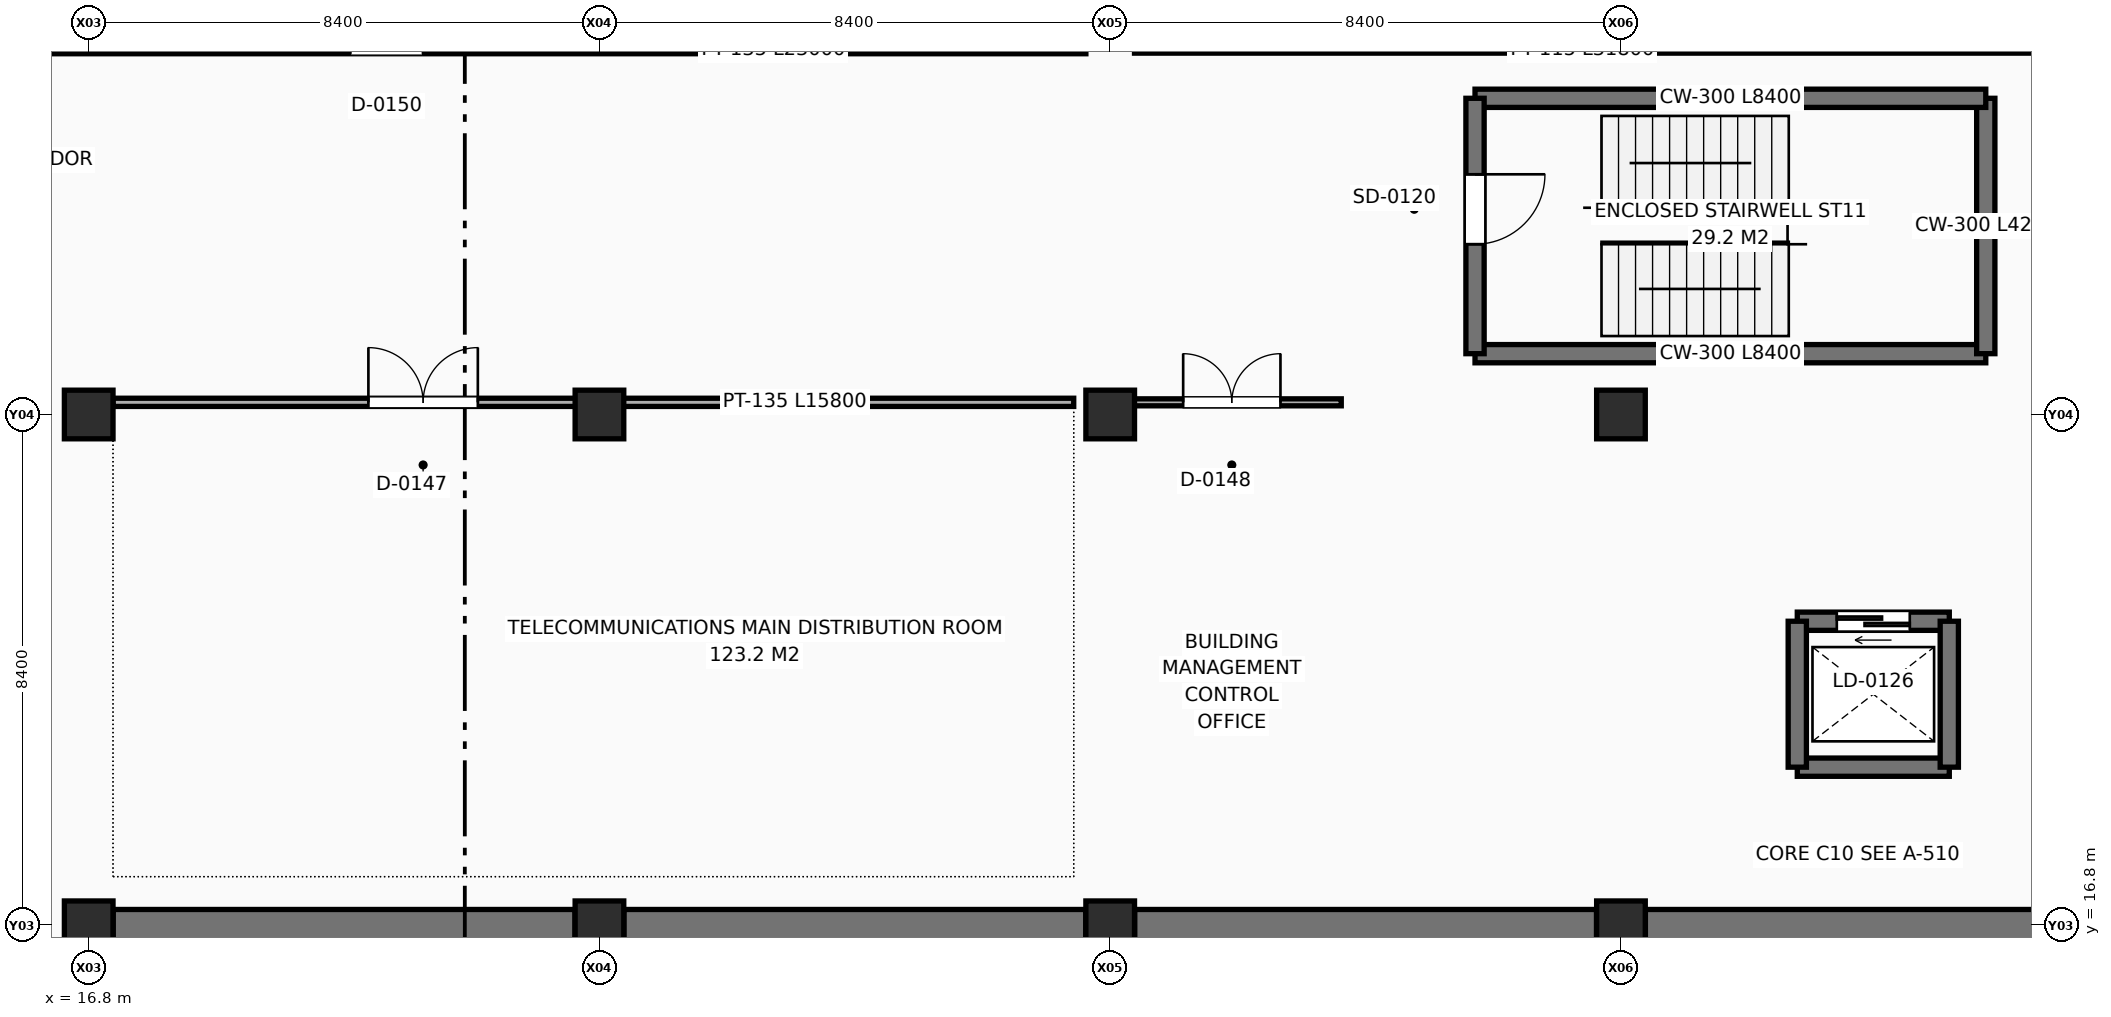
"""IFC4 building model, lengths in metres.
Left out: names, types, materials, properties, quantities, classifications, styles, units other than length and angle.
Written with IfcOpenShell. Run it as: python <this file> out.ifc"""

import sys

from ifc_helpers import new_model, si_unit, direction, frame, frame_2d, origin, origin_2d, place, context, subcontext, project, spatial, rectangle, extrude, element, fill, save


model = new_model("IFC4")
c1 = context("Model", 3, precision=1e-05, world=origin(), true_north=direction((0.0, 1.0)))
c2 = subcontext(c1, "Body", "Model", "MODEL_VIEW")
j1 = project(units=[si_unit("LENGTHUNIT", "METRE"), si_unit("PLANEANGLEUNIT", "RADIAN")], contexts=[c1])
p1 = place(None, origin())
s1 = spatial("IfcSite", under=j1, at=p1, CompositionType="ELEMENT")
p2 = place(p1, origin())
s2 = spatial("IfcBuilding", under=s1, at=p2, CompositionType="ELEMENT")
p3 = place(p2, frame((0.0, 0.0, -4.2)))
s3 = spatial("IfcBuildingStorey", under=s2, at=p3, CompositionType="ELEMENT", Elevation=-4.2)
for number, where, z_axis, x_axis in (
    (1, (16.8, 16.8, 0.0), (0.0, 0.0, 1.0), (1.0, 0.0, 0.0)),
    (2, (16.8, 25.2, 0.0), (0.0, 0.0, 1.0), (1.0, 0.0, 0.0)),
    (3, (25.2, 16.8, 0.0), (0.0, 0.0, 1.0), (1.0, 0.0, 0.0)),
    (4, (25.2, 25.2, 0.0), (0.0, 0.0, 1.0), (1.0, 0.0, 0.0)),
    (5, (33.6, 16.8, 0.0), (0.0, 0.0, 1.0), (1.0, 0.0, 0.0)),
    (6, (33.6, 25.2, 0.0), (0.0, 0.0, 1.0), (1.0, 0.0, 0.0)),
    (7, (42.0, 16.8, 0.0), (0.0, 0.0, 1.0), (1.0, 0.0, 0.0)),
    (8, (42.0, 25.2, 0.0), (0.0, 0.0, 1.0), (1.0, 0.0, 0.0)),
):
    element("IfcColumn", number, at=place(p3, frame(where, z_axis=z_axis, x_axis=x_axis)), inside=s3, PredefinedType="COLUMN", context=c2, shape_type="SweptSolid", body=[
        extrude(rectangle(XDim=0.8, YDim=0.8, at=origin_2d()), origin(), (0.0, 0.0, 1.0), 4.2),
    ])
p4 = place(p3, frame((17.202, 16.8, 0.0), z_axis=(0.0, 0.0, 1.0), x_axis=(1.0, 0.0, 0.0)))
e9 = element("IfcWall", 9, at=p4, inside=s3, PredefinedType="SOLIDWALL", context=c2, shape_type="SweptSolid", body=[
    extrude(rectangle(XDim=7.596, YDim=0.52, at=frame_2d((3.798, 0.0))), origin(), (0.0, 0.0, 1.0), 3.94),
])
for number, where, z_axis, x_axis in (
    (10, (25.602, 16.8, 0.0), (0.0, 0.0, 1.0), (1.0, 0.0, 0.0)),
    (11, (34.002, 16.8, 0.0), (0.0, 0.0, 1.0), (1.0, 0.0, 0.0)),
    (12, (42.402, 16.8, 0.0), (0.0, 0.0, 1.0), (1.0, 0.0, 0.0)),
):
    element("IfcWall", number, at=place(p3, frame(where, z_axis=z_axis, x_axis=x_axis)), inside=s3, PredefinedType="SOLIDWALL", context=c2, shape_type="SweptSolid", body=[
        extrude(rectangle(XDim=7.596, YDim=0.52, at=frame_2d((3.798, 0.0))), origin(), (0.0, 0.0, 1.0), 3.94),
    ])
p5 = place(p3, frame((39.6, 26.2, 0.0), z_axis=(0.0, 0.0, 1.0), x_axis=(1.0, 0.0, 0.0)))
e13 = element("IfcWall", 13, at=p5, inside=s3, PredefinedType="SHEAR", context=c2, shape_type="SweptSolid", body=[
    extrude(rectangle(XDim=8.4, YDim=0.3, at=frame_2d((4.2, 0.0))), origin(), (0.0, 0.0, 1.0), 3.92),
])
p6 = place(p3, frame((48.0, 26.2, 0.0), z_axis=(0.0, 0.0, 1.0), x_axis=(0.0, 1.0, 0.0)))
e14 = element("IfcWall", 14, at=p6, inside=s3, PredefinedType="SHEAR", context=c2, shape_type="SweptSolid", body=[
    extrude(rectangle(XDim=4.2, YDim=0.3, at=frame_2d((2.1, 0.0))), origin(), (0.0, 0.0, 1.0), 3.92),
])
p7 = place(p3, frame((48.0, 30.4, 0.0), z_axis=(0.0, 0.0, 1.0), x_axis=(-1.0, 0.0, 0.0)))
e15 = element("IfcWall", 15, at=p7, inside=s3, PredefinedType="SHEAR", context=c2, shape_type="SweptSolid", body=[
    extrude(rectangle(XDim=8.4, YDim=0.3, at=frame_2d((4.2, 0.0))), origin(), (0.0, 0.0, 1.0), 3.92),
])
p8 = place(p3, frame((39.6, 30.4, 0.0), z_axis=(0.0, 0.0, 1.0), x_axis=(0.0, -1.0, 0.0)))
e16 = element("IfcWall", 16, at=p8, inside=s3, PredefinedType="SHEAR", context=c2, shape_type="SweptSolid", body=[
    extrude(rectangle(XDim=4.2, YDim=0.3, at=frame_2d((2.1, 0.0))), origin(), (0.0, 0.0, 1.0), 3.92),
])
p9 = place(p8, frame((1.25, 0.0, 0.0)))
e17 = element("IfcOpeningElement", 17, at=p9, cuts=e16, PredefinedType="OPENING", context=c2, shape_type="SweptSolid", body=[
    extrude(rectangle(XDim=1.15, YDim=2.2, at=frame_2d((0.575, 1.1))), frame((0.0, 0.16, 0.0), z_axis=(0.0, -1.0, 0.0), x_axis=(1.0, 0.0, 0.0)), (0.0, 0.0, 1.0), 0.32),
])
p10 = place(p3, frame((47.4, 21.8, 0.0), z_axis=(0.0, 0.0, 1.0), x_axis=(-1.0, 0.0, 0.0)))
e18 = element("IfcWall", 18, at=p10, inside=s3, PredefinedType="SHEAR", context=c2, shape_type="SweptSolid", body=[
    extrude(rectangle(XDim=2.5, YDim=0.3, at=frame_2d((1.25, 0.0))), origin(), (0.0, 0.0, 1.0), 3.92),
])
p11 = place(p10, frame((0.65, 0.0, 0.0)))
e19 = element("IfcOpeningElement", 19, at=p11, cuts=e18, PredefinedType="OPENING", context=c2, shape_type="SweptSolid", body=[
    extrude(rectangle(XDim=1.2, YDim=2.25, at=frame_2d((0.6, 1.125))), frame((0.0, 0.16, 0.0), z_axis=(0.0, -1.0, 0.0), x_axis=(1.0, 0.0, 0.0)), (0.0, 0.0, 1.0), 0.32),
])
p12 = place(p3, frame((44.9, 19.4, 0.0), z_axis=(0.0, 0.0, 1.0), x_axis=(1.0, 0.0, 0.0)))
e20 = element("IfcWall", 20, at=p12, inside=s3, PredefinedType="SHEAR", context=c2, shape_type="SweptSolid", body=[
    extrude(rectangle(XDim=2.5, YDim=0.3, at=frame_2d((1.25, 0.0))), origin(), (0.0, 0.0, 1.0), 3.92),
])
for number, where, z_axis, x_axis in (
    (21, (44.9, 21.8, 0.0), (0.0, 0.0, 1.0), (0.0, -1.0, 0.0)),
    (22, (47.4, 19.4, 0.0), (0.0, 0.0, 1.0), (0.0, 1.0, 0.0)),
):
    element("IfcWall", number, at=place(p3, frame(where, z_axis=z_axis, x_axis=x_axis)), inside=s3, PredefinedType="SHEAR", context=c2, shape_type="SweptSolid", body=[
        extrude(rectangle(XDim=2.4, YDim=0.3, at=frame_2d((1.2, 0.0))), origin(), (0.0, 0.0, 1.0), 3.92),
    ])
p13 = place(p3, frame((17.2, 25.4, 0.0), z_axis=(0.0, 0.0, 1.0), x_axis=(1.0, 0.0, 0.0)))
e23 = element("IfcWall", 23, at=p13, inside=s3, PredefinedType="PARTITIONING", context=c2, shape_type="SweptSolid", body=[
    extrude(rectangle(XDim=15.8, YDim=0.135, at=frame_2d((7.9, 0.0))), origin(), (0.0, 0.0, 1.0), 3.29),
])
p14 = place(p13, frame((4.2, 0.0, 0.0)))
e24 = element("IfcOpeningElement", 24, at=p14, cuts=e23, PredefinedType="OPENING", context=c2, shape_type="SweptSolid", body=[
    extrude(rectangle(XDim=1.8, YDim=2.4, at=frame_2d((0.9, 1.2))), frame((0.0, 0.077, 0.0), z_axis=(0.0, -1.0, 0.0), x_axis=(1.0, 0.0, 0.0)), (0.0, 0.0, 1.0), 0.155),
])
p15 = place(p3, frame((33.8, 25.4, 0.0), z_axis=(0.0, 0.0, 1.0), x_axis=(1.0, 0.0, 0.0)))
e25 = element("IfcWall", 25, at=p15, inside=s3, PredefinedType="PARTITIONING", context=c2, shape_type="SweptSolid", body=[
    extrude(rectangle(XDim=3.6, YDim=0.115, at=frame_2d((1.8, 0.0))), origin(), (0.0, 0.0, 1.0), 3.29),
])
p16 = place(p15, frame((1.0, 0.0, 0.0)))
e26 = element("IfcOpeningElement", 26, at=p16, cuts=e25, PredefinedType="OPENING", context=c2, shape_type="SweptSolid", body=[
    extrude(rectangle(XDim=1.6, YDim=2.3, at=frame_2d((0.8, 1.15))), frame((0.0, 0.067, 0.0), z_axis=(0.0, -1.0, 0.0), x_axis=(1.0, 0.0, 0.0)), (0.0, 0.0, 1.0), 0.135),
])
p17 = place(p3, frame((10.2, 31.2, 0.0), z_axis=(0.0, 0.0, 1.0), x_axis=(1.0, 0.0, 0.0)))
e27 = element("IfcWall", 27, at=p17, inside=s3, PredefinedType="PARTITIONING", context=c2, shape_type="SweptSolid", body=[
    extrude(rectangle(XDim=23.0, YDim=0.135, at=frame_2d((11.5, 0.0))), origin(), (0.0, 0.0, 1.0), 3.86),
])
p18 = place(p17, frame((10.9, 0.0, 0.0)))
e28 = element("IfcOpeningElement", 28, at=p18, cuts=e27, PredefinedType="OPENING", context=c2, shape_type="SweptSolid", body=[
    extrude(rectangle(XDim=1.2, YDim=2.2, at=frame_2d((0.6, 1.1))), frame((0.0, 0.077, 0.0), z_axis=(0.0, -1.0, 0.0), x_axis=(1.0, 0.0, 0.0)), (0.0, 0.0, 1.0), 0.155),
])
p19 = place(p3, frame((34.0, 31.2, 0.0), z_axis=(0.0, 0.0, 1.0), x_axis=(1.0, 0.0, 0.0)))
e29 = element("IfcWall", 29, at=p19, inside=s3, PredefinedType="PARTITIONING", context=c2, shape_type="SweptSolid", body=[
    extrude(rectangle(XDim=31.8, YDim=0.115, at=frame_2d((15.9, 0.0))), origin(), (0.0, 0.0, 1.0), 3.86),
])
p20 = place(p19, frame((15.35, 0.0, 0.0)))
e30 = element("IfcOpeningElement", 30, at=p20, cuts=e29, PredefinedType="OPENING", context=c2, shape_type="SweptSolid", body=[
    extrude(rectangle(XDim=1.1, YDim=2.15, at=frame_2d((0.55, 1.075))), frame((0.0, 0.067, 0.0), z_axis=(0.0, -1.0, 0.0), x_axis=(1.0, 0.0, 0.0)), (0.0, 0.0, 1.0), 0.135),
])
p21 = place(p9, origin())
e31 = element("IfcDoor", 31, at=p21, inside=s3, OperationType="SINGLE_SWING_LEFT", PredefinedType="DOOR", context=c2, shape_type="SweptSolid", body=[
    extrude(rectangle(XDim=1.15, YDim=2.2, at=frame_2d((0.575, 1.1))), frame((0.0, 0.025, 0.0), z_axis=(0.0, -1.0, 0.0), x_axis=(1.0, 0.0, 0.0)), (0.0, 0.0, 1.0), 0.05),
])
fill(e17, e31)
p22 = place(p11, origin())
e32 = element("IfcDoor", 32, at=p22, inside=s3, OperationType="SLIDING_TO_LEFT", PredefinedType="DOOR", context=c2, shape_type="SweptSolid", body=[
    extrude(rectangle(XDim=1.2, YDim=2.25, at=frame_2d((0.6, 1.125))), frame((0.0, 0.025, 0.0), z_axis=(0.0, -1.0, 0.0), x_axis=(1.0, 0.0, 0.0)), (0.0, 0.0, 1.0), 0.05),
])
fill(e19, e32)
p23 = place(p14, origin())
e33 = element("IfcDoor", 33, at=p23, inside=s3, OperationType="DOUBLE_DOOR_SINGLE_SWING", PredefinedType="DOOR", context=c2, shape_type="SweptSolid", body=[
    extrude(rectangle(XDim=1.8, YDim=2.4, at=frame_2d((0.9, 1.2))), frame((0.0, 0.025, 0.0), z_axis=(0.0, -1.0, 0.0), x_axis=(1.0, 0.0, 0.0)), (0.0, 0.0, 1.0), 0.05),
])
fill(e24, e33)
p24 = place(p16, origin())
e34 = element("IfcDoor", 34, at=p24, inside=s3, OperationType="DOUBLE_DOOR_SINGLE_SWING", PredefinedType="DOOR", context=c2, shape_type="SweptSolid", body=[
    extrude(rectangle(XDim=1.6, YDim=2.3, at=frame_2d((0.8, 1.15))), frame((0.0, 0.025, 0.0), z_axis=(0.0, -1.0, 0.0), x_axis=(1.0, 0.0, 0.0)), (0.0, 0.0, 1.0), 0.05),
])
fill(e26, e34)
save(model, sys.argv[1])
